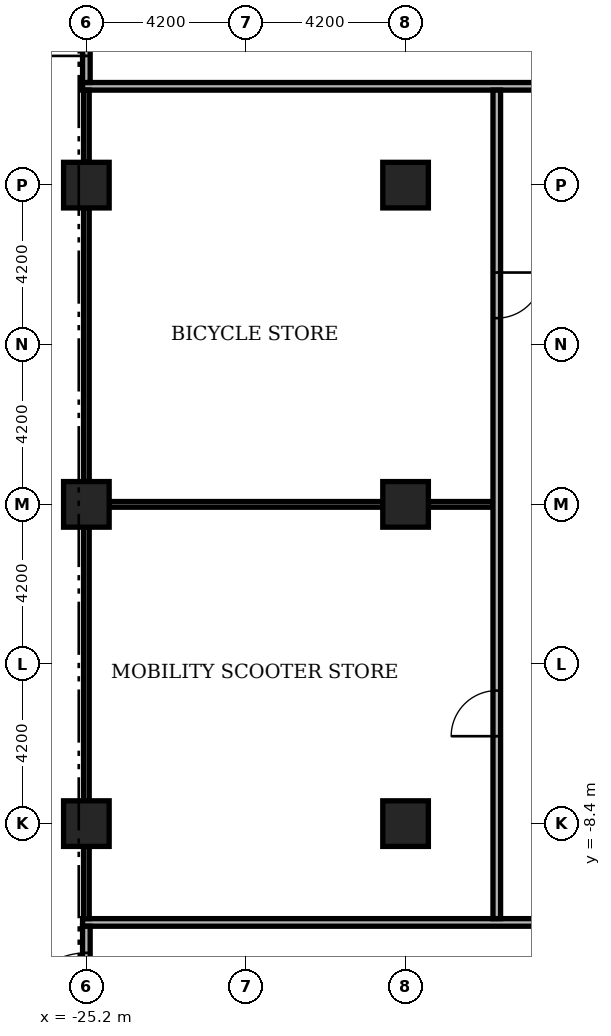
"""IFC4 building model, lengths in metres.
Left out: names, types, materials, properties, quantities, classifications, styles, units other than length and angle.
Written with IfcOpenShell. Run it as: python <this file> out.ifc"""

import sys

from ifc_helpers import new_model, si_unit, direction, frame, frame_2d, origin, origin_2d, place, context, subcontext, project, spatial, rectangle, extrude, element, fill, save


model = new_model("IFC4")
c1 = context("Model", 3, precision=1e-05, world=origin(), true_north=direction((0.0, 1.0)))
c2 = subcontext(c1, "Body", "Model", "MODEL_VIEW")
j1 = project(units=[si_unit("LENGTHUNIT", "METRE"), si_unit("PLANEANGLEUNIT", "RADIAN")], contexts=[c1])
p1 = place(None, origin())
s1 = spatial("IfcSite", under=j1, at=p1, CompositionType="ELEMENT")
p2 = place(p1, origin())
s2 = spatial("IfcBuilding", under=s1, at=p2, CompositionType="ELEMENT")
p3 = place(p2, frame((0.0, 0.0, -8.4)))
s3 = spatial("IfcBuildingStorey", under=s2, at=p3, CompositionType="ELEMENT", Elevation=-8.4)
for number, where, z_axis, x_axis in (
    (1, (-25.2, 0.0, 0.0), (0.0, 0.0, 1.0), (1.0, 0.0, 0.0)),
    (2, (-25.2, -8.4, 0.0), (0.0, 0.0, 1.0), (1.0, 0.0, 0.0)),
    (3, (-25.2, 8.4, 0.0), (0.0, 0.0, 1.0), (1.0, 0.0, 0.0)),
    (4, (-16.8, 0.0, 0.0), (0.0, 0.0, 1.0), (1.0, 0.0, 0.0)),
    (5, (-16.8, 8.4, 0.0), (0.0, 0.0, 1.0), (1.0, 0.0, 0.0)),
    (6, (-16.8, -8.4, 0.0), (0.0, 0.0, 1.0), (1.0, 0.0, 0.0)),
):
    element("IfcColumn", number, at=place(p3, frame(where, z_axis=z_axis, x_axis=x_axis)), inside=s3, PredefinedType="COLUMN", context=c2, shape_type="SweptSolid", body=[
        extrude(rectangle(XDim=1.2, YDim=1.2, at=origin_2d()), origin(), (0.0, 0.0, 1.0), 4.2),
    ])
p4 = place(p3, frame((-25.3, -11.0, 0.0), z_axis=(0.0, 0.0, 1.0), x_axis=(1.0, 0.0, 0.0)))
e7 = element("IfcWall", 7, at=p4, inside=s3, PredefinedType="PARTITIONING", context=c2, shape_type="SweptSolid", body=[
    extrude(rectangle(XDim=14.3, YDim=0.2, at=frame_2d((7.15, 0.0))), origin(), (0.0, 0.0, 1.0), 3.85),
])
p5 = place(p4, frame((12.0, 0.0, 0.0)))
e8 = element("IfcOpeningElement", 8, at=p5, cuts=e7, PredefinedType="OPENING", context=c2, shape_type="SweptSolid", body=[
    extrude(rectangle(XDim=1.2, YDim=2.2, at=frame_2d((0.6, 1.1))), frame((0.0, 0.11, 0.0), z_axis=(0.0, -1.0, 0.0), x_axis=(1.0, 0.0, 0.0)), (0.0, 0.0, 1.0), 0.22),
])
p6 = place(p3, frame((-24.6, 0.0, 0.0), z_axis=(0.0, 0.0, 1.0), x_axis=(1.0, 0.0, 0.0)))
e9 = element("IfcWall", 9, at=p6, inside=s3, PredefinedType="PARTITIONING", context=c2, shape_type="SweptSolid", body=[
    extrude(rectangle(XDim=7.2, YDim=0.15, at=frame_2d((3.6, 0.0))), origin(), (0.0, 0.0, 1.0), 3.85),
])
p7 = place(p3, frame((-16.2, 0.0, 0.0), z_axis=(0.0, 0.0, 1.0), x_axis=(1.0, 0.0, 0.0)))
e10 = element("IfcWall", 10, at=p7, inside=s3, PredefinedType="PARTITIONING", context=c2, shape_type="SweptSolid", body=[
    extrude(rectangle(XDim=1.7, YDim=0.15, at=frame_2d((0.85, 0.0))), origin(), (0.0, 0.0, 1.0), 3.85),
])
p8 = place(p3, frame((-25.3, 11.0, 0.0), z_axis=(0.0, 0.0, 1.0), x_axis=(1.0, 0.0, 0.0)))
e11 = element("IfcWall", 11, at=p8, inside=s3, PredefinedType="PARTITIONING", context=c2, shape_type="SweptSolid", body=[
    extrude(rectangle(XDim=14.3, YDim=0.2, at=frame_2d((7.15, 0.0))), origin(), (0.0, 0.0, 1.0), 3.85),
])
p9 = place(p8, frame((12.0, 0.0, 0.0)))
e12 = element("IfcOpeningElement", 12, at=p9, cuts=e11, PredefinedType="OPENING", context=c2, shape_type="SweptSolid", body=[
    extrude(rectangle(XDim=1.2, YDim=2.2, at=frame_2d((0.6, 1.1))), frame((0.0, 0.11, 0.0), z_axis=(0.0, -1.0, 0.0), x_axis=(1.0, 0.0, 0.0)), (0.0, 0.0, 1.0), 0.22),
])
p10 = place(p3, frame((-25.2, -14.3, 0.0), z_axis=(0.0, 0.0, 1.0), x_axis=(0.0, 1.0, 0.0)))
e13 = element("IfcWall", 13, at=p10, inside=s3, PredefinedType="PARTITIONING", context=c2, shape_type="SweptSolid", body=[
    extrude(rectangle(XDim=3.2, YDim=0.2, at=frame_2d((1.6, 0.0))), origin(), (0.0, 0.0, 1.0), 3.85),
])
p11 = place(p10, frame((0.7, 0.0, 0.0)))
e14 = element("IfcOpeningElement", 14, at=p11, cuts=e13, PredefinedType="OPENING", context=c2, shape_type="SweptSolid", body=[
    extrude(rectangle(XDim=1.8, YDim=2.2, at=frame_2d((0.9, 1.1))), frame((0.0, 0.11, 0.0), z_axis=(0.0, -1.0, 0.0), x_axis=(1.0, 0.0, 0.0)), (0.0, 0.0, 1.0), 0.22),
])
p12 = place(p3, frame((-25.2, -10.9, 0.0), z_axis=(0.0, 0.0, 1.0), x_axis=(0.0, 1.0, 0.0)))
e15 = element("IfcWall", 15, at=p12, inside=s3, PredefinedType="PARTITIONING", context=c2, shape_type="SweptSolid", body=[
    extrude(rectangle(XDim=1.9, YDim=0.15, at=frame_2d((0.95, 0.0))), origin(), (0.0, 0.0, 1.0), 3.85),
])
for number, where, z_axis, x_axis in (
    (16, (-25.2, -7.8, 0.0), (0.0, 0.0, 1.0), (0.0, 1.0, 0.0)),
    (17, (-25.2, 0.6, 0.0), (0.0, 0.0, 1.0), (0.0, 1.0, 0.0)),
):
    element("IfcWall", number, at=place(p3, frame(where, z_axis=z_axis, x_axis=x_axis)), inside=s3, PredefinedType="PARTITIONING", context=c2, shape_type="SweptSolid", body=[
        extrude(rectangle(XDim=7.2, YDim=0.15, at=frame_2d((3.6, 0.0))), origin(), (0.0, 0.0, 1.0), 3.85),
    ])
p13 = place(p3, frame((-25.2, 9.0, 0.0), z_axis=(0.0, 0.0, 1.0), x_axis=(0.0, 1.0, 0.0)))
e18 = element("IfcWall", 18, at=p13, inside=s3, PredefinedType="PARTITIONING", context=c2, shape_type="SweptSolid", body=[
    extrude(rectangle(XDim=1.9, YDim=0.15, at=frame_2d((0.95, 0.0))), origin(), (0.0, 0.0, 1.0), 3.85),
])
p14 = place(p3, frame((-25.2, 11.1, 0.0), z_axis=(0.0, 0.0, 1.0), x_axis=(0.0, 1.0, 0.0)))
e19 = element("IfcWall", 19, at=p14, inside=s3, PredefinedType="PARTITIONING", context=c2, shape_type="SweptSolid", body=[
    extrude(rectangle(XDim=3.2, YDim=0.2, at=frame_2d((1.6, 0.0))), origin(), (0.0, 0.0, 1.0), 3.85),
])
p15 = place(p14, frame((0.7, 0.0, 0.0)))
e20 = element("IfcOpeningElement", 20, at=p15, cuts=e19, PredefinedType="OPENING", context=c2, shape_type="SweptSolid", body=[
    extrude(rectangle(XDim=1.8, YDim=2.2, at=frame_2d((0.9, 1.1))), frame((0.0, 0.11, 0.0), z_axis=(0.0, -1.0, 0.0), x_axis=(1.0, 0.0, 0.0)), (0.0, 0.0, 1.0), 0.22),
])
p16 = place(p3, frame((-14.4, -10.9, 0.0), z_axis=(0.0, 0.0, 1.0), x_axis=(0.0, 1.0, 0.0)))
e21 = element("IfcWall", 21, at=p16, inside=s3, PredefinedType="PARTITIONING", context=c2, shape_type="SweptSolid", body=[
    extrude(rectangle(XDim=21.8, YDim=0.2, at=frame_2d((10.9, 0.0))), origin(), (0.0, 0.0, 1.0), 3.85),
])
p17 = place(p16, frame((4.8, 0.0, 0.0)))
e22 = element("IfcOpeningElement", 22, at=p17, cuts=e21, PredefinedType="OPENING", context=c2, shape_type="SweptSolid", body=[
    extrude(rectangle(XDim=1.2, YDim=2.2, at=frame_2d((0.6, 1.1))), frame((0.0, 0.11, 0.0), z_axis=(0.0, -1.0, 0.0), x_axis=(1.0, 0.0, 0.0)), (0.0, 0.0, 1.0), 0.22),
])
p18 = place(p16, frame((15.8, 0.0, 0.0)))
e23 = element("IfcOpeningElement", 23, at=p18, cuts=e21, PredefinedType="OPENING", context=c2, shape_type="SweptSolid", body=[
    extrude(rectangle(XDim=1.2, YDim=2.2, at=frame_2d((0.6, 1.1))), frame((0.0, 0.11, 0.0), z_axis=(0.0, -1.0, 0.0), x_axis=(1.0, 0.0, 0.0)), (0.0, 0.0, 1.0), 0.22),
])
p19 = place(p11, origin())
e24 = element("IfcDoor", 24, at=p19, inside=s3, OperationType="DOUBLE_DOOR_SINGLE_SWING", PredefinedType="DOOR", context=c2, shape_type="SweptSolid", body=[
    extrude(rectangle(XDim=1.8, YDim=2.2, at=frame_2d((0.9, 1.1))), frame((0.0, 0.025, 0.0), z_axis=(0.0, -1.0, 0.0), x_axis=(1.0, 0.0, 0.0)), (0.0, 0.0, 1.0), 0.05),
])
fill(e14, e24)
p20 = place(p17, origin())
e25 = element("IfcDoor", 25, at=p20, inside=s3, OperationType="SINGLE_SWING_LEFT", PredefinedType="DOOR", context=c2, shape_type="SweptSolid", body=[
    extrude(rectangle(XDim=1.2, YDim=2.2, at=frame_2d((0.6, 1.1))), frame((0.0, 0.025, 0.0), z_axis=(0.0, -1.0, 0.0), x_axis=(1.0, 0.0, 0.0)), (0.0, 0.0, 1.0), 0.05),
])
fill(e22, e25)
p21 = place(p18, origin())
e26 = element("IfcDoor", 26, at=p21, inside=s3, OperationType="SINGLE_SWING_RIGHT", PredefinedType="DOOR", context=c2, shape_type="SweptSolid", body=[
    extrude(rectangle(XDim=1.2, YDim=2.2, at=frame_2d((0.6, 1.1))), frame((0.0, 0.025, 0.0), z_axis=(0.0, -1.0, 0.0), x_axis=(1.0, 0.0, 0.0)), (0.0, 0.0, 1.0), 0.05),
])
fill(e23, e26)
p22 = place(p15, origin())
e27 = element("IfcDoor", 27, at=p22, inside=s3, OperationType="DOUBLE_DOOR_SINGLE_SWING", PredefinedType="DOOR", context=c2, shape_type="SweptSolid", body=[
    extrude(rectangle(XDim=1.8, YDim=2.2, at=frame_2d((0.9, 1.1))), frame((0.0, 0.025, 0.0), z_axis=(0.0, -1.0, 0.0), x_axis=(1.0, 0.0, 0.0)), (0.0, 0.0, 1.0), 0.05),
])
fill(e20, e27)
save(model, sys.argv[1])
